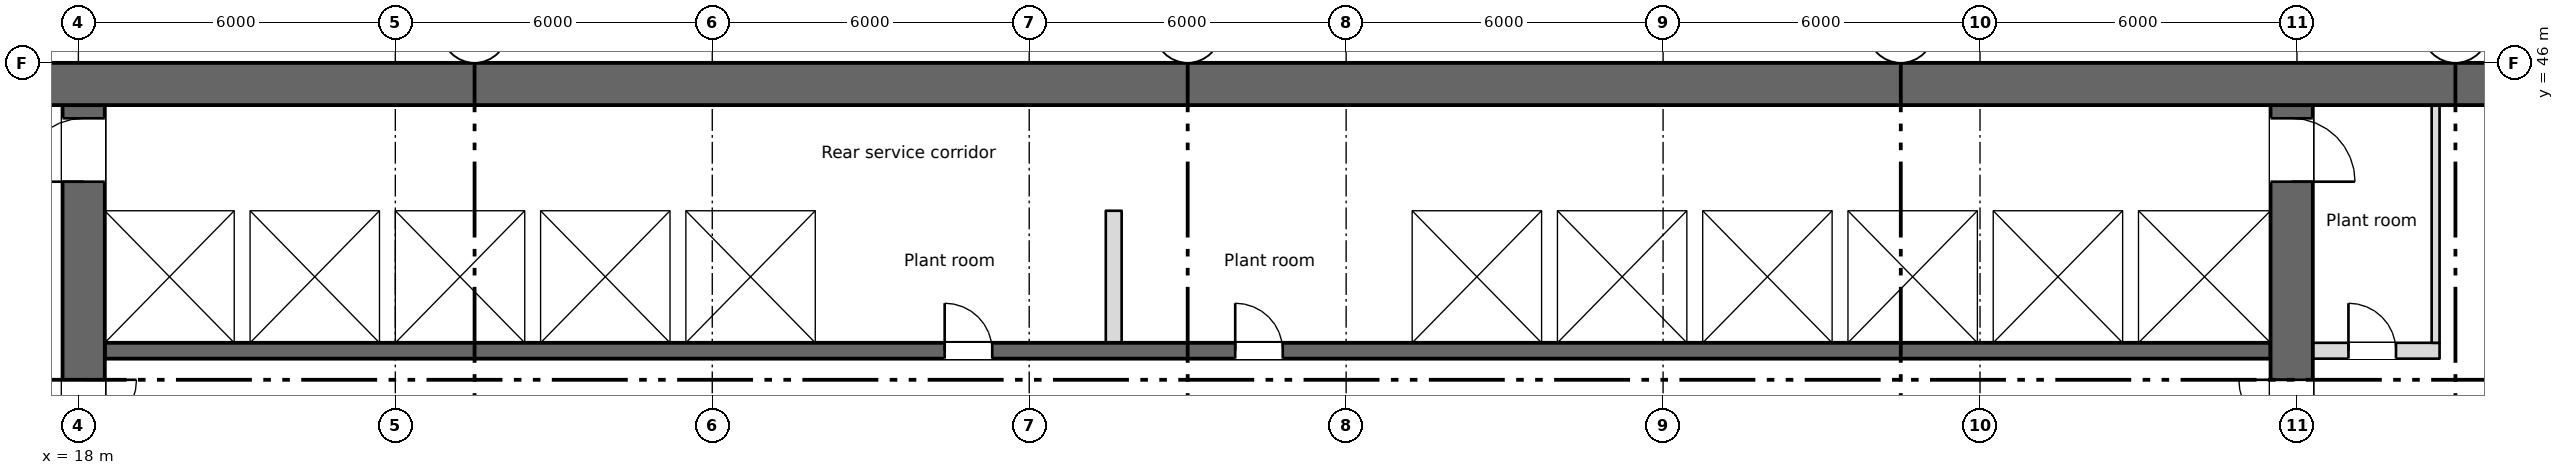
"""IFC4 building model, lengths in metres.
Left out: names, types, materials, properties, quantities, classifications, styles, units other than length and angle.
Written with IfcOpenShell. Run it as: python <this file> out.ifc"""

import sys

from ifc_helpers import new_model, si_unit, direction, frame, frame_2d, origin, place, context, subcontext, project, spatial, rectangle, extrude, element, fill, save


model = new_model("IFC4")
c1 = context("Model", 3, precision=1e-05, world=origin(), true_north=direction((0.0, 1.0)))
c2 = subcontext(c1, "Body", "Model", "MODEL_VIEW")
j1 = project(units=[si_unit("LENGTHUNIT", "METRE"), si_unit("PLANEANGLEUNIT", "RADIAN")], contexts=[c1])
p1 = place(None, origin())
s1 = spatial("IfcSite", under=j1, at=p1, CompositionType="ELEMENT")
p2 = place(p1, origin())
s2 = spatial("IfcBuilding", under=s1, at=p2, CompositionType="ELEMENT")
p3 = place(p2, frame((0.0, 0.0, 158.75)))
s3 = spatial("IfcBuildingStorey", under=s2, at=p3, CompositionType="ELEMENT", Elevation=158.75)
p4 = place(p3, frame((5.55, 45.6, 0.0), z_axis=(0.0, 0.0, 1.0), x_axis=(1.0, 0.0, 0.0)))
e1 = element("IfcWall", 1, at=p4, inside=s3, PredefinedType="SHEAR", context=c2, shape_type="SweptSolid", body=[
    extrude(rectangle(XDim=60.9, YDim=0.8, at=frame_2d((30.45, 0.0))), origin(), (0.0, 0.0, 1.0), 7.2),
])
p5 = place(p3, frame((18.1, 28.4, 0.0), z_axis=(0.0, 0.0, 1.0), x_axis=(0.0, 1.0, 0.0)))
e2 = element("IfcWall", 2, at=p5, inside=s3, PredefinedType="SHEAR", context=c2, shape_type="SweptSolid", body=[
    extrude(rectangle(XDim=16.8, YDim=0.8, at=frame_2d((8.4, 0.0))), origin(), (0.0, 0.0, 1.0), 7.2),
])
p6 = place(p5, frame((9.6, 0.0, 0.0)))
e3 = element("IfcOpeningElement", 3, at=p6, cuts=e2, PredefinedType="OPENING", context=c2, shape_type="SweptSolid", body=[
    extrude(rectangle(XDim=2.0, YDim=2.1, at=frame_2d((1.0, 1.05))), frame((0.0, 0.41, 0.0), z_axis=(0.0, -1.0, 0.0), x_axis=(1.0, 0.0, 0.0)), (0.0, 0.0, 1.0), 0.82),
])
p7 = place(p5, frame((15.35, 0.0, 0.0)))
e4 = element("IfcOpeningElement", 4, at=p7, cuts=e2, PredefinedType="OPENING", context=c2, shape_type="SweptSolid", body=[
    extrude(rectangle(XDim=1.2, YDim=2.1, at=frame_2d((0.6, 1.05))), frame((0.0, 0.41, 0.0), z_axis=(0.0, -1.0, 0.0), x_axis=(1.0, 0.0, 0.0)), (0.0, 0.0, 1.0), 0.82),
])
p8 = place(p3, frame((59.9, 28.4, 0.0), z_axis=(0.0, 0.0, 1.0), x_axis=(0.0, 1.0, 0.0)))
e5 = element("IfcWall", 5, at=p8, inside=s3, PredefinedType="SHEAR", context=c2, shape_type="SweptSolid", body=[
    extrude(rectangle(XDim=16.8, YDim=0.8, at=frame_2d((8.4, 0.0))), origin(), (0.0, 0.0, 1.0), 7.2),
])
p9 = place(p8, frame((9.6, 0.0, 0.0)))
e6 = element("IfcOpeningElement", 6, at=p9, cuts=e5, PredefinedType="OPENING", context=c2, shape_type="SweptSolid", body=[
    extrude(rectangle(XDim=2.0, YDim=2.1, at=frame_2d((1.0, 1.05))), frame((0.0, 0.41, 0.0), z_axis=(0.0, -1.0, 0.0), x_axis=(1.0, 0.0, 0.0)), (0.0, 0.0, 1.0), 0.82),
])
p10 = place(p8, frame((15.35, 0.0, 0.0)))
e7 = element("IfcOpeningElement", 7, at=p10, cuts=e5, PredefinedType="OPENING", context=c2, shape_type="SweptSolid", body=[
    extrude(rectangle(XDim=1.2, YDim=2.1, at=frame_2d((0.6, 1.05))), frame((0.0, 0.41, 0.0), z_axis=(0.0, -1.0, 0.0), x_axis=(1.0, 0.0, 0.0)), (0.0, 0.0, 1.0), 0.82),
])
p11 = place(p3, frame((18.5, 40.55, 0.0), z_axis=(0.0, 0.0, 1.0), x_axis=(1.0, 0.0, 0.0)))
e8 = element("IfcWall", 8, at=p11, inside=s3, PredefinedType="SHEAR", context=c2, shape_type="SweptSolid", body=[
    extrude(rectangle(XDim=41.0, YDim=0.3, at=frame_2d((20.5, 0.0))), origin(), (0.0, 0.0, 1.0), 7.2),
])
p12 = place(p11, frame((15.9, 0.0, 0.0)))
e9 = element("IfcOpeningElement", 9, at=p12, cuts=e8, PredefinedType="OPENING", context=c2, shape_type="SweptSolid", body=[
    extrude(rectangle(XDim=0.9, YDim=2.1, at=frame_2d((0.45, 1.05))), frame((0.0, 0.16, 0.0), z_axis=(0.0, -1.0, 0.0), x_axis=(1.0, 0.0, 0.0)), (0.0, 0.0, 1.0), 0.32),
])
p13 = place(p11, frame((21.4, 0.0, 0.0)))
e10 = element("IfcOpeningElement", 10, at=p13, cuts=e8, PredefinedType="OPENING", context=c2, shape_type="SweptSolid", body=[
    extrude(rectangle(XDim=0.9, YDim=2.1, at=frame_2d((0.45, 1.05))), frame((0.0, 0.16, 0.0), z_axis=(0.0, -1.0, 0.0), x_axis=(1.0, 0.0, 0.0)), (0.0, 0.0, 1.0), 0.32),
])
p14 = place(p11, frame((0.675, 0.0, 0.0)))
e11 = element("IfcOpeningElement", 11, at=p14, cuts=e8, PredefinedType="OPENING", context=c2, shape_type="SweptSolid", body=[
    extrude(rectangle(XDim=1.1, YDim=2.1, at=frame_2d((0.55, 1.05))), frame((0.0, 0.16, 0.0), z_axis=(0.0, -1.0, 0.0), x_axis=(1.0, 0.0, 0.0)), (0.0, 0.0, 1.0), 0.32),
])
p15 = place(p11, frame((3.425, 0.0, 0.0)))
e12 = element("IfcOpeningElement", 12, at=p15, cuts=e8, PredefinedType="OPENING", context=c2, shape_type="SweptSolid", body=[
    extrude(rectangle(XDim=1.1, YDim=2.1, at=frame_2d((0.55, 1.05))), frame((0.0, 0.16, 0.0), z_axis=(0.0, -1.0, 0.0), x_axis=(1.0, 0.0, 0.0)), (0.0, 0.0, 1.0), 0.32),
])
p16 = place(p11, frame((5.575, 0.0, 0.0)))
e13 = element("IfcOpeningElement", 13, at=p16, cuts=e8, PredefinedType="OPENING", context=c2, shape_type="SweptSolid", body=[
    extrude(rectangle(XDim=1.1, YDim=2.1, at=frame_2d((0.55, 1.05))), frame((0.0, 0.16, 0.0), z_axis=(0.0, -1.0, 0.0), x_axis=(1.0, 0.0, 0.0)), (0.0, 0.0, 1.0), 0.32),
])
p17 = place(p11, frame((6.775, 0.0, 0.0)))
e14 = element("IfcOpeningElement", 14, at=p17, cuts=e8, PredefinedType="OPENING", context=c2, shape_type="SweptSolid", body=[
    extrude(rectangle(XDim=1.1, YDim=2.1, at=frame_2d((0.55, 1.05))), frame((0.0, 0.16, 0.0), z_axis=(0.0, -1.0, 0.0), x_axis=(1.0, 0.0, 0.0)), (0.0, 0.0, 1.0), 0.32),
])
p18 = place(p11, frame((8.325, 0.0, 0.0)))
e15 = element("IfcOpeningElement", 15, at=p18, cuts=e8, PredefinedType="OPENING", context=c2, shape_type="SweptSolid", body=[
    extrude(rectangle(XDim=1.1, YDim=2.1, at=frame_2d((0.55, 1.05))), frame((0.0, 0.16, 0.0), z_axis=(0.0, -1.0, 0.0), x_axis=(1.0, 0.0, 0.0)), (0.0, 0.0, 1.0), 0.32),
])
p19 = place(p11, frame((9.525, 0.0, 0.0)))
e16 = element("IfcOpeningElement", 16, at=p19, cuts=e8, PredefinedType="OPENING", context=c2, shape_type="SweptSolid", body=[
    extrude(rectangle(XDim=1.1, YDim=2.1, at=frame_2d((0.55, 1.05))), frame((0.0, 0.16, 0.0), z_axis=(0.0, -1.0, 0.0), x_axis=(1.0, 0.0, 0.0)), (0.0, 0.0, 1.0), 0.32),
])
p20 = place(p11, frame((11.075, 0.0, 0.0)))
e17 = element("IfcOpeningElement", 17, at=p20, cuts=e8, PredefinedType="OPENING", context=c2, shape_type="SweptSolid", body=[
    extrude(rectangle(XDim=1.1, YDim=2.1, at=frame_2d((0.55, 1.05))), frame((0.0, 0.16, 0.0), z_axis=(0.0, -1.0, 0.0), x_axis=(1.0, 0.0, 0.0)), (0.0, 0.0, 1.0), 0.32),
])
p21 = place(p11, frame((12.275, 0.0, 0.0)))
e18 = element("IfcOpeningElement", 18, at=p21, cuts=e8, PredefinedType="OPENING", context=c2, shape_type="SweptSolid", body=[
    extrude(rectangle(XDim=1.1, YDim=2.1, at=frame_2d((0.55, 1.05))), frame((0.0, 0.16, 0.0), z_axis=(0.0, -1.0, 0.0), x_axis=(1.0, 0.0, 0.0)), (0.0, 0.0, 1.0), 0.32),
])
p22 = place(p11, frame((25.425, 0.0, 0.0)))
e19 = element("IfcOpeningElement", 19, at=p22, cuts=e8, PredefinedType="OPENING", context=c2, shape_type="SweptSolid", body=[
    extrude(rectangle(XDim=1.1, YDim=2.1, at=frame_2d((0.55, 1.05))), frame((0.0, 0.16, 0.0), z_axis=(0.0, -1.0, 0.0), x_axis=(1.0, 0.0, 0.0)), (0.0, 0.0, 1.0), 0.32),
])
p23 = place(p11, frame((28.175, 0.0, 0.0)))
e20 = element("IfcOpeningElement", 20, at=p23, cuts=e8, PredefinedType="OPENING", context=c2, shape_type="SweptSolid", body=[
    extrude(rectangle(XDim=1.1, YDim=2.1, at=frame_2d((0.55, 1.05))), frame((0.0, 0.16, 0.0), z_axis=(0.0, -1.0, 0.0), x_axis=(1.0, 0.0, 0.0)), (0.0, 0.0, 1.0), 0.32),
])
p24 = place(p11, frame((30.325, 0.0, 0.0)))
e21 = element("IfcOpeningElement", 21, at=p24, cuts=e8, PredefinedType="OPENING", context=c2, shape_type="SweptSolid", body=[
    extrude(rectangle(XDim=1.1, YDim=2.1, at=frame_2d((0.55, 1.05))), frame((0.0, 0.16, 0.0), z_axis=(0.0, -1.0, 0.0), x_axis=(1.0, 0.0, 0.0)), (0.0, 0.0, 1.0), 0.32),
])
p25 = place(p11, frame((31.525, 0.0, 0.0)))
e22 = element("IfcOpeningElement", 22, at=p25, cuts=e8, PredefinedType="OPENING", context=c2, shape_type="SweptSolid", body=[
    extrude(rectangle(XDim=1.1, YDim=2.1, at=frame_2d((0.55, 1.05))), frame((0.0, 0.16, 0.0), z_axis=(0.0, -1.0, 0.0), x_axis=(1.0, 0.0, 0.0)), (0.0, 0.0, 1.0), 0.32),
])
p26 = place(p11, frame((33.075, 0.0, 0.0)))
e23 = element("IfcOpeningElement", 23, at=p26, cuts=e8, PredefinedType="OPENING", context=c2, shape_type="SweptSolid", body=[
    extrude(rectangle(XDim=1.1, YDim=2.1, at=frame_2d((0.55, 1.05))), frame((0.0, 0.16, 0.0), z_axis=(0.0, -1.0, 0.0), x_axis=(1.0, 0.0, 0.0)), (0.0, 0.0, 1.0), 0.32),
])
p27 = place(p11, frame((34.275, 0.0, 0.0)))
e24 = element("IfcOpeningElement", 24, at=p27, cuts=e8, PredefinedType="OPENING", context=c2, shape_type="SweptSolid", body=[
    extrude(rectangle(XDim=1.1, YDim=2.1, at=frame_2d((0.55, 1.05))), frame((0.0, 0.16, 0.0), z_axis=(0.0, -1.0, 0.0), x_axis=(1.0, 0.0, 0.0)), (0.0, 0.0, 1.0), 0.32),
])
p28 = place(p11, frame((36.375, 0.0, 0.0)))
e25 = element("IfcOpeningElement", 25, at=p28, cuts=e8, PredefinedType="OPENING", context=c2, shape_type="SweptSolid", body=[
    extrude(rectangle(XDim=1.2, YDim=2.1, at=frame_2d((0.6, 1.05))), frame((0.0, 0.16, 0.0), z_axis=(0.0, -1.0, 0.0), x_axis=(1.0, 0.0, 0.0)), (0.0, 0.0, 1.0), 0.32),
])
p29 = place(p11, frame((39.15, 0.0, 0.0)))
e26 = element("IfcOpeningElement", 26, at=p29, cuts=e8, PredefinedType="OPENING", context=c2, shape_type="SweptSolid", body=[
    extrude(rectangle(XDim=1.2, YDim=2.1, at=frame_2d((0.6, 1.05))), frame((0.0, 0.16, 0.0), z_axis=(0.0, -1.0, 0.0), x_axis=(1.0, 0.0, 0.0)), (0.0, 0.0, 1.0), 0.32),
])
p30 = place(p3, frame((18.5, 43.35, 0.0), z_axis=(0.0, 0.0, 1.0), x_axis=(1.0, 0.0, 0.0)))
e27 = element("IfcWall", 27, at=p30, inside=s3, PredefinedType="SHEAR", context=c2, shape_type="SweptSolid", body=[
    extrude(rectangle(XDim=41.0, YDim=0.3, at=frame_2d((20.5, 0.0))), origin(), (0.0, 0.0, 1.0), 7.2),
])
p31 = place(p3, frame((60.3, 40.55, 0.0), z_axis=(0.0, 0.0, 1.0), x_axis=(1.0, 0.0, 0.0)))
e28 = element("IfcWall", 28, at=p31, inside=s3, PredefinedType="PARTITIONING", context=c2, shape_type="SweptSolid", body=[
    extrude(rectangle(XDim=2.4, YDim=0.3, at=frame_2d((1.2, 0.0))), origin(), (0.0, 0.0, 1.0), 7.2),
])
p32 = place(p31, frame((0.675, 0.0, 0.0)))
e29 = element("IfcOpeningElement", 29, at=p32, cuts=e28, PredefinedType="OPENING", context=c2, shape_type="SweptSolid", body=[
    extrude(rectangle(XDim=0.9, YDim=2.1, at=frame_2d((0.45, 1.05))), frame((0.0, 0.16, 0.0), z_axis=(0.0, -1.0, 0.0), x_axis=(1.0, 0.0, 0.0)), (0.0, 0.0, 1.0), 0.32),
])
for number, where, z_axis, x_axis in (
    (30, (21.1, 40.7, 0.0), (0.0, 0.0, 1.0), (0.0, 1.0, 0.0)),
    (31, (23.85, 40.7, 0.0), (0.0, 0.0, 1.0), (0.0, 1.0, 0.0)),
    (32, (26.6, 40.7, 0.0), (0.0, 0.0, 1.0), (0.0, 1.0, 0.0)),
    (33, (29.35, 40.7, 0.0), (0.0, 0.0, 1.0), (0.0, 1.0, 0.0)),
    (34, (32.1, 40.7, 0.0), (0.0, 0.0, 1.0), (0.0, 1.0, 0.0)),
    (35, (43.1, 40.7, 0.0), (0.0, 0.0, 1.0), (0.0, 1.0, 0.0)),
    (36, (45.85, 40.7, 0.0), (0.0, 0.0, 1.0), (0.0, 1.0, 0.0)),
    (37, (48.6, 40.7, 0.0), (0.0, 0.0, 1.0), (0.0, 1.0, 0.0)),
    (38, (51.35, 40.7, 0.0), (0.0, 0.0, 1.0), (0.0, 1.0, 0.0)),
    (39, (54.1, 40.7, 0.0), (0.0, 0.0, 1.0), (0.0, 1.0, 0.0)),
    (40, (56.85, 40.7, 0.0), (0.0, 0.0, 1.0), (0.0, 1.0, 0.0)),
):
    element("IfcWall", number, at=place(p3, frame(where, z_axis=z_axis, x_axis=x_axis)), inside=s3, PredefinedType="SHEAR", context=c2, shape_type="SweptSolid", body=[
        extrude(rectangle(XDim=2.5, YDim=0.3, at=frame_2d((1.25, 0.0))), origin(), (0.0, 0.0, 1.0), 7.2),
    ])
p33 = place(p3, frame((62.625, 40.7, 0.0), z_axis=(0.0, 0.0, 1.0), x_axis=(0.0, 1.0, 0.0)))
e41 = element("IfcWall", 41, at=p33, inside=s3, PredefinedType="PARTITIONING", context=c2, shape_type="SweptSolid", body=[
    extrude(rectangle(XDim=4.5, YDim=0.15, at=frame_2d((2.25, 0.0))), origin(), (0.0, 0.0, 1.0), 7.2),
])
p34 = place(p3, frame((37.6, 40.7, 0.0), z_axis=(0.0, 0.0, 1.0), x_axis=(0.0, 1.0, 0.0)))
e42 = element("IfcWall", 42, at=p34, inside=s3, PredefinedType="PARTITIONING", context=c2, shape_type="SweptSolid", body=[
    extrude(rectangle(XDim=2.5, YDim=0.3, at=frame_2d((1.25, 0.0))), origin(), (0.0, 0.0, 1.0), 7.2),
])
p35 = place(p32, origin())
e43 = element("IfcDoor", 43, at=p35, inside=s3, OperationType="SINGLE_SWING_LEFT", PredefinedType="DOOR", context=c2, shape_type="SweptSolid", body=[
    extrude(rectangle(XDim=0.9, YDim=2.1, at=frame_2d((0.45, 1.05))), frame((0.0, 0.025, 0.0), z_axis=(0.0, -1.0, 0.0), x_axis=(1.0, 0.0, 0.0)), (0.0, 0.0, 1.0), 0.05),
])
fill(e29, e43)
p36 = place(p12, origin())
e44 = element("IfcDoor", 44, at=p36, inside=s3, OperationType="SINGLE_SWING_LEFT", PredefinedType="DOOR", context=c2, shape_type="SweptSolid", body=[
    extrude(rectangle(XDim=0.9, YDim=2.1, at=frame_2d((0.45, 1.05))), frame((0.0, 0.025, 0.0), z_axis=(0.0, -1.0, 0.0), x_axis=(1.0, 0.0, 0.0)), (0.0, 0.0, 1.0), 0.05),
])
fill(e9, e44)
p37 = place(p13, origin())
e45 = element("IfcDoor", 45, at=p37, inside=s3, OperationType="SINGLE_SWING_LEFT", PredefinedType="DOOR", context=c2, shape_type="SweptSolid", body=[
    extrude(rectangle(XDim=0.9, YDim=2.1, at=frame_2d((0.45, 1.05))), frame((0.0, 0.025, 0.0), z_axis=(0.0, -1.0, 0.0), x_axis=(1.0, 0.0, 0.0)), (0.0, 0.0, 1.0), 0.05),
])
fill(e10, e45)
p38 = place(p14, origin())
e46 = element("IfcDoor", 46, at=p38, inside=s3, OperationType="SLIDING_TO_LEFT", PredefinedType="DOOR", context=c2, shape_type="SweptSolid", body=[
    extrude(rectangle(XDim=1.1, YDim=2.1, at=frame_2d((0.55, 1.05))), frame((0.0, 0.025, 0.0), z_axis=(0.0, -1.0, 0.0), x_axis=(1.0, 0.0, 0.0)), (0.0, 0.0, 1.0), 0.05),
])
fill(e11, e46)
p39 = place(p15, origin())
e47 = element("IfcDoor", 47, at=p39, inside=s3, OperationType="SLIDING_TO_LEFT", PredefinedType="DOOR", context=c2, shape_type="SweptSolid", body=[
    extrude(rectangle(XDim=1.1, YDim=2.1, at=frame_2d((0.55, 1.05))), frame((0.0, 0.025, 0.0), z_axis=(0.0, -1.0, 0.0), x_axis=(1.0, 0.0, 0.0)), (0.0, 0.0, 1.0), 0.05),
])
fill(e12, e47)
p40 = place(p16, origin())
e48 = element("IfcDoor", 48, at=p40, inside=s3, OperationType="SLIDING_TO_LEFT", PredefinedType="DOOR", context=c2, shape_type="SweptSolid", body=[
    extrude(rectangle(XDim=1.1, YDim=2.1, at=frame_2d((0.55, 1.05))), frame((0.0, 0.025, 0.0), z_axis=(0.0, -1.0, 0.0), x_axis=(1.0, 0.0, 0.0)), (0.0, 0.0, 1.0), 0.05),
])
fill(e13, e48)
p41 = place(p17, origin())
e49 = element("IfcDoor", 49, at=p41, inside=s3, OperationType="SLIDING_TO_LEFT", PredefinedType="DOOR", context=c2, shape_type="SweptSolid", body=[
    extrude(rectangle(XDim=1.1, YDim=2.1, at=frame_2d((0.55, 1.05))), frame((0.0, 0.025, 0.0), z_axis=(0.0, -1.0, 0.0), x_axis=(1.0, 0.0, 0.0)), (0.0, 0.0, 1.0), 0.05),
])
fill(e14, e49)
p42 = place(p18, origin())
e50 = element("IfcDoor", 50, at=p42, inside=s3, OperationType="SLIDING_TO_LEFT", PredefinedType="DOOR", context=c2, shape_type="SweptSolid", body=[
    extrude(rectangle(XDim=1.1, YDim=2.1, at=frame_2d((0.55, 1.05))), frame((0.0, 0.025, 0.0), z_axis=(0.0, -1.0, 0.0), x_axis=(1.0, 0.0, 0.0)), (0.0, 0.0, 1.0), 0.05),
])
fill(e15, e50)
p43 = place(p19, origin())
e51 = element("IfcDoor", 51, at=p43, inside=s3, OperationType="SLIDING_TO_LEFT", PredefinedType="DOOR", context=c2, shape_type="SweptSolid", body=[
    extrude(rectangle(XDim=1.1, YDim=2.1, at=frame_2d((0.55, 1.05))), frame((0.0, 0.025, 0.0), z_axis=(0.0, -1.0, 0.0), x_axis=(1.0, 0.0, 0.0)), (0.0, 0.0, 1.0), 0.05),
])
fill(e16, e51)
p44 = place(p20, origin())
e52 = element("IfcDoor", 52, at=p44, inside=s3, OperationType="SLIDING_TO_LEFT", PredefinedType="DOOR", context=c2, shape_type="SweptSolid", body=[
    extrude(rectangle(XDim=1.1, YDim=2.1, at=frame_2d((0.55, 1.05))), frame((0.0, 0.025, 0.0), z_axis=(0.0, -1.0, 0.0), x_axis=(1.0, 0.0, 0.0)), (0.0, 0.0, 1.0), 0.05),
])
fill(e17, e52)
p45 = place(p21, origin())
e53 = element("IfcDoor", 53, at=p45, inside=s3, OperationType="SLIDING_TO_LEFT", PredefinedType="DOOR", context=c2, shape_type="SweptSolid", body=[
    extrude(rectangle(XDim=1.1, YDim=2.1, at=frame_2d((0.55, 1.05))), frame((0.0, 0.025, 0.0), z_axis=(0.0, -1.0, 0.0), x_axis=(1.0, 0.0, 0.0)), (0.0, 0.0, 1.0), 0.05),
])
fill(e18, e53)
p46 = place(p22, origin())
e54 = element("IfcDoor", 54, at=p46, inside=s3, OperationType="SLIDING_TO_LEFT", PredefinedType="DOOR", context=c2, shape_type="SweptSolid", body=[
    extrude(rectangle(XDim=1.1, YDim=2.1, at=frame_2d((0.55, 1.05))), frame((0.0, 0.025, 0.0), z_axis=(0.0, -1.0, 0.0), x_axis=(1.0, 0.0, 0.0)), (0.0, 0.0, 1.0), 0.05),
])
fill(e19, e54)
p47 = place(p23, origin())
e55 = element("IfcDoor", 55, at=p47, inside=s3, OperationType="SLIDING_TO_LEFT", PredefinedType="DOOR", context=c2, shape_type="SweptSolid", body=[
    extrude(rectangle(XDim=1.1, YDim=2.1, at=frame_2d((0.55, 1.05))), frame((0.0, 0.025, 0.0), z_axis=(0.0, -1.0, 0.0), x_axis=(1.0, 0.0, 0.0)), (0.0, 0.0, 1.0), 0.05),
])
fill(e20, e55)
p48 = place(p24, origin())
e56 = element("IfcDoor", 56, at=p48, inside=s3, OperationType="SLIDING_TO_LEFT", PredefinedType="DOOR", context=c2, shape_type="SweptSolid", body=[
    extrude(rectangle(XDim=1.1, YDim=2.1, at=frame_2d((0.55, 1.05))), frame((0.0, 0.025, 0.0), z_axis=(0.0, -1.0, 0.0), x_axis=(1.0, 0.0, 0.0)), (0.0, 0.0, 1.0), 0.05),
])
fill(e21, e56)
p49 = place(p25, origin())
e57 = element("IfcDoor", 57, at=p49, inside=s3, OperationType="SLIDING_TO_LEFT", PredefinedType="DOOR", context=c2, shape_type="SweptSolid", body=[
    extrude(rectangle(XDim=1.1, YDim=2.1, at=frame_2d((0.55, 1.05))), frame((0.0, 0.025, 0.0), z_axis=(0.0, -1.0, 0.0), x_axis=(1.0, 0.0, 0.0)), (0.0, 0.0, 1.0), 0.05),
])
fill(e22, e57)
p50 = place(p26, origin())
e58 = element("IfcDoor", 58, at=p50, inside=s3, OperationType="SLIDING_TO_LEFT", PredefinedType="DOOR", context=c2, shape_type="SweptSolid", body=[
    extrude(rectangle(XDim=1.1, YDim=2.1, at=frame_2d((0.55, 1.05))), frame((0.0, 0.025, 0.0), z_axis=(0.0, -1.0, 0.0), x_axis=(1.0, 0.0, 0.0)), (0.0, 0.0, 1.0), 0.05),
])
fill(e23, e58)
p51 = place(p27, origin())
e59 = element("IfcDoor", 59, at=p51, inside=s3, OperationType="SLIDING_TO_LEFT", PredefinedType="DOOR", context=c2, shape_type="SweptSolid", body=[
    extrude(rectangle(XDim=1.1, YDim=2.1, at=frame_2d((0.55, 1.05))), frame((0.0, 0.025, 0.0), z_axis=(0.0, -1.0, 0.0), x_axis=(1.0, 0.0, 0.0)), (0.0, 0.0, 1.0), 0.05),
])
fill(e24, e59)
p52 = place(p28, origin())
e60 = element("IfcDoor", 60, at=p52, inside=s3, OperationType="SLIDING_TO_LEFT", PredefinedType="DOOR", context=c2, shape_type="SweptSolid", body=[
    extrude(rectangle(XDim=1.2, YDim=2.1, at=frame_2d((0.6, 1.05))), frame((0.0, 0.025, 0.0), z_axis=(0.0, -1.0, 0.0), x_axis=(1.0, 0.0, 0.0)), (0.0, 0.0, 1.0), 0.05),
])
fill(e25, e60)
p53 = place(p29, origin())
e61 = element("IfcDoor", 61, at=p53, inside=s3, OperationType="SLIDING_TO_LEFT", PredefinedType="DOOR", context=c2, shape_type="SweptSolid", body=[
    extrude(rectangle(XDim=1.2, YDim=2.1, at=frame_2d((0.6, 1.05))), frame((0.0, 0.025, 0.0), z_axis=(0.0, -1.0, 0.0), x_axis=(1.0, 0.0, 0.0)), (0.0, 0.0, 1.0), 0.05),
])
fill(e26, e61)
p54 = place(p6, origin())
e62 = element("IfcDoor", 62, at=p54, inside=s3, OperationType="DOUBLE_DOOR_SINGLE_SWING", PredefinedType="DOOR", context=c2, shape_type="SweptSolid", body=[
    extrude(rectangle(XDim=2.0, YDim=2.1, at=frame_2d((1.0, 1.05))), frame((0.0, 0.025, 0.0), z_axis=(0.0, -1.0, 0.0), x_axis=(1.0, 0.0, 0.0)), (0.0, 0.0, 1.0), 0.05),
])
fill(e3, e62)
p55 = place(p9, origin())
e63 = element("IfcDoor", 63, at=p55, inside=s3, OperationType="DOUBLE_DOOR_SINGLE_SWING", PredefinedType="DOOR", context=c2, shape_type="SweptSolid", body=[
    extrude(rectangle(XDim=2.0, YDim=2.1, at=frame_2d((1.0, 1.05))), frame((0.0, 0.025, 0.0), z_axis=(0.0, -1.0, 0.0), x_axis=(1.0, 0.0, 0.0)), (0.0, 0.0, 1.0), 0.05),
])
fill(e6, e63)
p56 = place(p7, origin())
e64 = element("IfcDoor", 64, at=p56, inside=s3, OperationType="SINGLE_SWING_LEFT", PredefinedType="DOOR", context=c2, shape_type="SweptSolid", body=[
    extrude(rectangle(XDim=1.2, YDim=2.1, at=frame_2d((0.6, 1.05))), frame((0.0, 0.025, 0.0), z_axis=(0.0, -1.0, 0.0), x_axis=(1.0, 0.0, 0.0)), (0.0, 0.0, 1.0), 0.05),
])
fill(e4, e64)
p57 = place(p10, origin())
e65 = element("IfcDoor", 65, at=p57, inside=s3, OperationType="SINGLE_SWING_LEFT", PredefinedType="DOOR", context=c2, shape_type="SweptSolid", body=[
    extrude(rectangle(XDim=1.2, YDim=2.1, at=frame_2d((0.6, 1.05))), frame((0.0, 0.025, 0.0), z_axis=(0.0, -1.0, 0.0), x_axis=(1.0, 0.0, 0.0)), (0.0, 0.0, 1.0), 0.05),
])
fill(e7, e65)
save(model, sys.argv[1])
